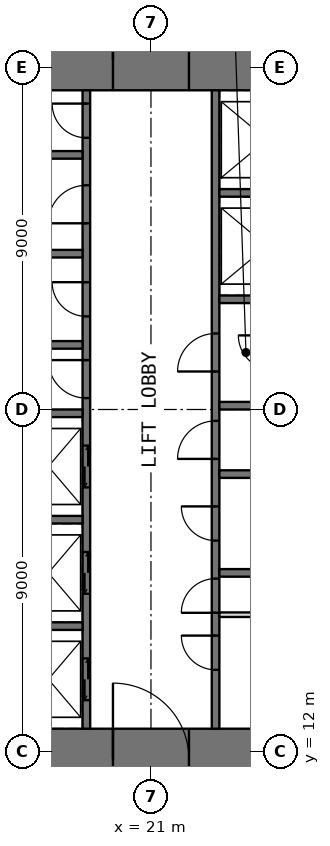
"""IFC4 building model, lengths in metres.
Left out: names, types, materials, properties, quantities, classifications, styles, units other than length and angle.
Written with IfcOpenShell. Run it as: python <this file> out.ifc"""

import sys

from ifc_helpers import new_model, si_unit, direction, frame, frame_2d, origin, place, context, subcontext, project, spatial, rectangle, extrude, element, fill, save


model = new_model("IFC4")
c1 = context("Model", 3, precision=1e-05, world=origin(), true_north=direction((0.0, 1.0)))
c2 = subcontext(c1, "Body", "Model", "MODEL_VIEW")
j1 = project(units=[si_unit("LENGTHUNIT", "METRE"), si_unit("PLANEANGLEUNIT", "RADIAN")], contexts=[c1])
p1 = place(None, origin())
s1 = spatial("IfcSite", under=j1, at=p1, CompositionType="ELEMENT")
p2 = place(p1, origin())
s2 = spatial("IfcBuilding", under=s1, at=p2, CompositionType="ELEMENT")
p3 = place(p2, frame((0.0, 0.0, 120.5)))
s3 = spatial("IfcBuildingStorey", under=s2, at=p3, CompositionType="ELEMENT", Elevation=120.5)
p4 = place(p3, frame((11.0, 11.8, -0.05), z_axis=(0.0, 0.0, 1.0), x_axis=(1.0, 0.0, 0.0)))
e1 = element("IfcWall", 1, at=p4, inside=s3, PredefinedType="SHEAR", context=c2, shape_type="SweptSolid", body=[
    extrude(rectangle(XDim=20.0, YDim=1.6, at=frame_2d((10.0, 0.0))), origin(), (0.0, 0.0, 1.0), 4.0),
])
p5 = place(p4, frame((9.0, 0.0, 0.05)))
e2 = element("IfcOpeningElement", 2, at=p5, cuts=e1, PredefinedType="OPENING", context=c2, shape_type="SweptSolid", body=[
    extrude(rectangle(XDim=2.0, YDim=2.2, at=frame_2d((1.0, 1.1))), frame((0.0, 0.81, 0.0), z_axis=(0.0, -1.0, 0.0), x_axis=(1.0, 0.0, 0.0)), (0.0, 0.0, 1.0), 1.62),
])
p6 = place(p3, frame((11.0, 30.2, -0.05), z_axis=(0.0, 0.0, 1.0), x_axis=(1.0, 0.0, 0.0)))
e3 = element("IfcWall", 3, at=p6, inside=s3, PredefinedType="SHEAR", context=c2, shape_type="SweptSolid", body=[
    extrude(rectangle(XDim=20.0, YDim=1.6, at=frame_2d((10.0, 0.0))), origin(), (0.0, 0.0, 1.0), 4.0),
])
p7 = place(p6, frame((9.0, 0.0, 0.05)))
e4 = element("IfcOpeningElement", 4, at=p7, cuts=e3, PredefinedType="OPENING", context=c2, shape_type="SweptSolid", body=[
    extrude(rectangle(XDim=2.0, YDim=2.2, at=frame_2d((1.0, 1.1))), frame((0.0, 0.81, 0.0), z_axis=(0.0, -1.0, 0.0), x_axis=(1.0, 0.0, 0.0)), (0.0, 0.0, 1.0), 1.62),
])
p8 = place(p3, frame((19.3, 12.6, -0.05), z_axis=(0.0, 0.0, 1.0), x_axis=(0.0, 1.0, 0.0)))
e5 = element("IfcWall", 5, at=p8, inside=s3, PredefinedType="SHEAR", context=c2, shape_type="SweptSolid", body=[
    extrude(rectangle(XDim=16.8, YDim=0.2, at=frame_2d((8.4, 0.0))), origin(), (0.0, 0.0, 1.0), 4.0),
])
p9 = place(p8, frame((8.7, 0.0, 0.05)))
e6 = element("IfcOpeningElement", 6, at=p9, cuts=e5, PredefinedType="OPENING", context=c2, shape_type="SweptSolid", body=[
    extrude(rectangle(XDim=1.0, YDim=2.2, at=frame_2d((0.5, 1.1))), frame((0.0, 0.11, 0.0), z_axis=(0.0, -1.0, 0.0), x_axis=(1.0, 0.0, 0.0)), (0.0, 0.0, 1.0), 0.22),
])
p10 = place(p8, frame((10.85, 0.0, 0.05)))
e7 = element("IfcOpeningElement", 7, at=p10, cuts=e5, PredefinedType="OPENING", context=c2, shape_type="SweptSolid", body=[
    extrude(rectangle(XDim=0.9, YDim=2.2, at=frame_2d((0.45, 1.1))), frame((0.0, 0.11, 0.0), z_axis=(0.0, -1.0, 0.0), x_axis=(1.0, 0.0, 0.0)), (0.0, 0.0, 1.0), 0.22),
])
p11 = place(p8, frame((13.3, 0.0, 0.05)))
e8 = element("IfcOpeningElement", 8, at=p11, cuts=e5, PredefinedType="OPENING", context=c2, shape_type="SweptSolid", body=[
    extrude(rectangle(XDim=1.0, YDim=2.2, at=frame_2d((0.5, 1.1))), frame((0.0, 0.11, 0.0), z_axis=(0.0, -1.0, 0.0), x_axis=(1.0, 0.0, 0.0)), (0.0, 0.0, 1.0), 0.22),
])
p12 = place(p8, frame((15.55, 0.0, 0.05)))
e9 = element("IfcOpeningElement", 9, at=p12, cuts=e5, PredefinedType="OPENING", context=c2, shape_type="SweptSolid", body=[
    extrude(rectangle(XDim=0.9, YDim=2.2, at=frame_2d((0.45, 1.1))), frame((0.0, 0.11, 0.0), z_axis=(0.0, -1.0, 0.0), x_axis=(1.0, 0.0, 0.0)), (0.0, 0.0, 1.0), 0.22),
])
p13 = place(p8, frame((0.75, 0.0, 0.05)))
e10 = element("IfcOpeningElement", 10, at=p13, cuts=e5, PredefinedType="OPENING", context=c2, shape_type="SweptSolid", body=[
    extrude(rectangle(XDim=1.1, YDim=2.2, at=frame_2d((0.55, 1.1))), frame((0.0, 0.11, 0.0), z_axis=(0.0, -1.0, 0.0), x_axis=(1.0, 0.0, 0.0)), (0.0, 0.0, 1.0), 0.22),
])
p14 = place(p8, frame((3.55, 0.0, 0.05)))
e11 = element("IfcOpeningElement", 11, at=p14, cuts=e5, PredefinedType="OPENING", context=c2, shape_type="SweptSolid", body=[
    extrude(rectangle(XDim=1.1, YDim=2.2, at=frame_2d((0.55, 1.1))), frame((0.0, 0.11, 0.0), z_axis=(0.0, -1.0, 0.0), x_axis=(1.0, 0.0, 0.0)), (0.0, 0.0, 1.0), 0.22),
])
p15 = place(p8, frame((6.35, 0.0, 0.05)))
e12 = element("IfcOpeningElement", 12, at=p15, cuts=e5, PredefinedType="OPENING", context=c2, shape_type="SweptSolid", body=[
    extrude(rectangle(XDim=1.1, YDim=2.2, at=frame_2d((0.55, 1.1))), frame((0.0, 0.11, 0.0), z_axis=(0.0, -1.0, 0.0), x_axis=(1.0, 0.0, 0.0)), (0.0, 0.0, 1.0), 0.22),
])
p16 = place(p3, frame((22.7, 12.6, -0.05), z_axis=(0.0, 0.0, 1.0), x_axis=(0.0, 1.0, 0.0)))
e13 = element("IfcWall", 13, at=p16, inside=s3, PredefinedType="SHEAR", context=c2, shape_type="SweptSolid", body=[
    extrude(rectangle(XDim=16.8, YDim=0.2, at=frame_2d((8.4, 0.0))), origin(), (0.0, 0.0, 1.0), 4.0),
])
p17 = place(p16, frame((3.05, 0.0, 0.05)))
e14 = element("IfcOpeningElement", 14, at=p17, cuts=e13, PredefinedType="OPENING", context=c2, shape_type="SweptSolid", body=[
    extrude(rectangle(XDim=0.9, YDim=2.2, at=frame_2d((0.45, 1.1))), frame((0.0, 0.11, 0.0), z_axis=(0.0, -1.0, 0.0), x_axis=(1.0, 0.0, 0.0)), (0.0, 0.0, 1.0), 0.22),
])
p18 = place(p16, frame((7.1, 0.0, 0.05)))
e15 = element("IfcOpeningElement", 15, at=p18, cuts=e13, PredefinedType="OPENING", context=c2, shape_type="SweptSolid", body=[
    extrude(rectangle(XDim=1.0, YDim=2.2, at=frame_2d((0.5, 1.1))), frame((0.0, 0.11, 0.0), z_axis=(0.0, -1.0, 0.0), x_axis=(1.0, 0.0, 0.0)), (0.0, 0.0, 1.0), 0.22),
])
p19 = place(p16, frame((1.55, 0.0, 0.05)))
e16 = element("IfcOpeningElement", 16, at=p19, cuts=e13, PredefinedType="OPENING", context=c2, shape_type="SweptSolid", body=[
    extrude(rectangle(XDim=0.9, YDim=2.2, at=frame_2d((0.45, 1.1))), frame((0.0, 0.11, 0.0), z_axis=(0.0, -1.0, 0.0), x_axis=(1.0, 0.0, 0.0)), (0.0, 0.0, 1.0), 0.22),
])
p20 = place(p16, frame((4.95, 0.0, 0.05)))
e17 = element("IfcOpeningElement", 17, at=p20, cuts=e13, PredefinedType="OPENING", context=c2, shape_type="SweptSolid", body=[
    extrude(rectangle(XDim=0.9, YDim=2.2, at=frame_2d((0.45, 1.1))), frame((0.0, 0.11, 0.0), z_axis=(0.0, -1.0, 0.0), x_axis=(1.0, 0.0, 0.0)), (0.0, 0.0, 1.0), 0.22),
])
p21 = place(p16, frame((9.4, 0.0, 0.05)))
e18 = element("IfcOpeningElement", 18, at=p21, cuts=e13, PredefinedType="OPENING", context=c2, shape_type="SweptSolid", body=[
    extrude(rectangle(XDim=1.0, YDim=2.2, at=frame_2d((0.5, 1.1))), frame((0.0, 0.11, 0.0), z_axis=(0.0, -1.0, 0.0), x_axis=(1.0, 0.0, 0.0)), (0.0, 0.0, 1.0), 0.22),
])
for number, where, z_axis, x_axis in (
    (19, (16.0, 15.3, -0.05), (0.0, 0.0, 1.0), (1.0, 0.0, 0.0)),
    (20, (16.0, 18.1, -0.05), (0.0, 0.0, 1.0), (1.0, 0.0, 0.0)),
    (21, (16.0, 20.9, -0.05), (0.0, 0.0, 1.0), (1.0, 0.0, 0.0)),
    (22, (16.0, 22.7, -0.05), (0.0, 0.0, 1.0), (1.0, 0.0, 0.0)),
    (23, (16.0, 25.1, -0.05), (0.0, 0.0, 1.0), (1.0, 0.0, 0.0)),
    (24, (16.0, 27.7, -0.05), (0.0, 0.0, 1.0), (1.0, 0.0, 0.0)),
    (25, (22.8, 16.7, -0.05), (0.0, 0.0, 1.0), (1.0, 0.0, 0.0)),
    (26, (22.8, 19.3, -0.05), (0.0, 0.0, 1.0), (1.0, 0.0, 0.0)),
    (27, (22.8, 21.1, -0.05), (0.0, 0.0, 1.0), (1.0, 0.0, 0.0)),
    (28, (22.8, 23.9, -0.05), (0.0, 0.0, 1.0), (1.0, 0.0, 0.0)),
    (29, (22.8, 26.7, -0.05), (0.0, 0.0, 1.0), (1.0, 0.0, 0.0)),
):
    element("IfcWall", number, at=place(p3, frame(where, z_axis=z_axis, x_axis=x_axis)), inside=s3, PredefinedType="SHEAR", context=c2, shape_type="SweptSolid", body=[
        extrude(rectangle(XDim=3.2, YDim=0.2, at=frame_2d((1.6, 0.0))), origin(), (0.0, 0.0, 1.0), 4.0),
    ])
p22 = place(p3, frame((22.8, 15.6, 0.0), z_axis=(0.0, 0.0, 1.0), x_axis=(1.0, 0.0, 0.0)))
e30 = element("IfcWall", 30, at=p22, inside=s3, PredefinedType="PARTITIONING", context=c2, shape_type="SweptSolid", body=[
    extrude(rectangle(XDim=3.2, YDim=0.12, at=frame_2d((1.6, 0.0))), origin(), (0.0, 0.0, 1.0), 3.75),
])
p23 = place(p5, origin())
e31 = element("IfcDoor", 31, at=p23, inside=s3, OperationType="DOUBLE_DOOR_SINGLE_SWING", PredefinedType="DOOR", context=c2, shape_type="SweptSolid", body=[
    extrude(rectangle(XDim=2.0, YDim=2.2, at=frame_2d((1.0, 1.1))), frame((0.0, 0.025, 0.0), z_axis=(0.0, -1.0, 0.0), x_axis=(1.0, 0.0, 0.0)), (0.0, 0.0, 1.0), 0.05),
])
fill(e2, e31)
p24 = place(p7, origin())
e32 = element("IfcDoor", 32, at=p24, inside=s3, OperationType="DOUBLE_DOOR_SINGLE_SWING", PredefinedType="DOOR", context=c2, shape_type="SweptSolid", body=[
    extrude(rectangle(XDim=2.0, YDim=2.2, at=frame_2d((1.0, 1.1))), frame((0.0, 0.025, 0.0), z_axis=(0.0, -1.0, 0.0), x_axis=(1.0, 0.0, 0.0)), (0.0, 0.0, 1.0), 0.05),
])
fill(e4, e32)
p25 = place(p17, origin())
e33 = element("IfcDoor", 33, at=p25, inside=s3, OperationType="SINGLE_SWING_LEFT", PredefinedType="DOOR", context=c2, shape_type="SweptSolid", body=[
    extrude(rectangle(XDim=0.9, YDim=2.2, at=frame_2d((0.45, 1.1))), frame((0.0, 0.025, 0.0), z_axis=(0.0, -1.0, 0.0), x_axis=(1.0, 0.0, 0.0)), (0.0, 0.0, 1.0), 0.05),
])
fill(e14, e33)
p26 = place(p9, origin())
e34 = element("IfcDoor", 34, at=p26, inside=s3, OperationType="SINGLE_SWING_RIGHT", PredefinedType="DOOR", context=c2, shape_type="SweptSolid", body=[
    extrude(rectangle(XDim=1.0, YDim=2.2, at=frame_2d((0.5, 1.1))), frame((0.0, 0.025, 0.0), z_axis=(0.0, -1.0, 0.0), x_axis=(1.0, 0.0, 0.0)), (0.0, 0.0, 1.0), 0.05),
])
fill(e6, e34)
p27 = place(p18, origin())
e35 = element("IfcDoor", 35, at=p27, inside=s3, OperationType="SINGLE_SWING_LEFT", PredefinedType="DOOR", context=c2, shape_type="SweptSolid", body=[
    extrude(rectangle(XDim=1.0, YDim=2.2, at=frame_2d((0.5, 1.1))), frame((0.0, 0.025, 0.0), z_axis=(0.0, -1.0, 0.0), x_axis=(1.0, 0.0, 0.0)), (0.0, 0.0, 1.0), 0.05),
])
fill(e15, e35)
p28 = place(p10, origin())
e36 = element("IfcDoor", 36, at=p28, inside=s3, OperationType="SINGLE_SWING_RIGHT", PredefinedType="DOOR", context=c2, shape_type="SweptSolid", body=[
    extrude(rectangle(XDim=0.9, YDim=2.2, at=frame_2d((0.45, 1.1))), frame((0.0, 0.025, 0.0), z_axis=(0.0, -1.0, 0.0), x_axis=(1.0, 0.0, 0.0)), (0.0, 0.0, 1.0), 0.05),
])
fill(e7, e36)
p29 = place(p11, origin())
e37 = element("IfcDoor", 37, at=p29, inside=s3, OperationType="SINGLE_SWING_LEFT", PredefinedType="DOOR", context=c2, shape_type="SweptSolid", body=[
    extrude(rectangle(XDim=1.0, YDim=2.2, at=frame_2d((0.5, 1.1))), frame((0.0, 0.025, 0.0), z_axis=(0.0, -1.0, 0.0), x_axis=(1.0, 0.0, 0.0)), (0.0, 0.0, 1.0), 0.05),
])
fill(e8, e37)
p30 = place(p12, origin())
e38 = element("IfcDoor", 38, at=p30, inside=s3, OperationType="SINGLE_SWING_RIGHT", PredefinedType="DOOR", context=c2, shape_type="SweptSolid", body=[
    extrude(rectangle(XDim=0.9, YDim=2.2, at=frame_2d((0.45, 1.1))), frame((0.0, 0.025, 0.0), z_axis=(0.0, -1.0, 0.0), x_axis=(1.0, 0.0, 0.0)), (0.0, 0.0, 1.0), 0.05),
])
fill(e9, e38)
p31 = place(p19, origin())
e39 = element("IfcDoor", 39, at=p31, inside=s3, OperationType="SINGLE_SWING_RIGHT", PredefinedType="DOOR", context=c2, shape_type="SweptSolid", body=[
    extrude(rectangle(XDim=0.9, YDim=2.2, at=frame_2d((0.45, 1.1))), frame((0.0, 0.025, 0.0), z_axis=(0.0, -1.0, 0.0), x_axis=(1.0, 0.0, 0.0)), (0.0, 0.0, 1.0), 0.05),
])
fill(e16, e39)
p32 = place(p20, origin())
e40 = element("IfcDoor", 40, at=p32, inside=s3, OperationType="SINGLE_SWING_RIGHT", PredefinedType="DOOR", context=c2, shape_type="SweptSolid", body=[
    extrude(rectangle(XDim=0.9, YDim=2.2, at=frame_2d((0.45, 1.1))), frame((0.0, 0.025, 0.0), z_axis=(0.0, -1.0, 0.0), x_axis=(1.0, 0.0, 0.0)), (0.0, 0.0, 1.0), 0.05),
])
fill(e17, e40)
p33 = place(p21, origin())
e41 = element("IfcDoor", 41, at=p33, inside=s3, OperationType="SINGLE_SWING_LEFT", PredefinedType="DOOR", context=c2, shape_type="SweptSolid", body=[
    extrude(rectangle(XDim=1.0, YDim=2.2, at=frame_2d((0.5, 1.1))), frame((0.0, 0.025, 0.0), z_axis=(0.0, -1.0, 0.0), x_axis=(1.0, 0.0, 0.0)), (0.0, 0.0, 1.0), 0.05),
])
fill(e18, e41)
p34 = place(p13, origin())
e42 = element("IfcDoor", 42, at=p34, inside=s3, OperationType="DOUBLE_DOOR_SLIDING", PredefinedType="DOOR", context=c2, shape_type="SweptSolid", body=[
    extrude(rectangle(XDim=1.1, YDim=2.2, at=frame_2d((0.55, 1.1))), frame((0.0, 0.025, 0.0), z_axis=(0.0, -1.0, 0.0), x_axis=(1.0, 0.0, 0.0)), (0.0, 0.0, 1.0), 0.05),
])
fill(e10, e42)
p35 = place(p14, origin())
e43 = element("IfcDoor", 43, at=p35, inside=s3, OperationType="DOUBLE_DOOR_SLIDING", PredefinedType="DOOR", context=c2, shape_type="SweptSolid", body=[
    extrude(rectangle(XDim=1.1, YDim=2.2, at=frame_2d((0.55, 1.1))), frame((0.0, 0.025, 0.0), z_axis=(0.0, -1.0, 0.0), x_axis=(1.0, 0.0, 0.0)), (0.0, 0.0, 1.0), 0.05),
])
fill(e11, e43)
p36 = place(p15, origin())
e44 = element("IfcDoor", 44, at=p36, inside=s3, OperationType="DOUBLE_DOOR_SLIDING", PredefinedType="DOOR", context=c2, shape_type="SweptSolid", body=[
    extrude(rectangle(XDim=1.1, YDim=2.2, at=frame_2d((0.55, 1.1))), frame((0.0, 0.025, 0.0), z_axis=(0.0, -1.0, 0.0), x_axis=(1.0, 0.0, 0.0)), (0.0, 0.0, 1.0), 0.05),
])
fill(e12, e44)
save(model, sys.argv[1])
